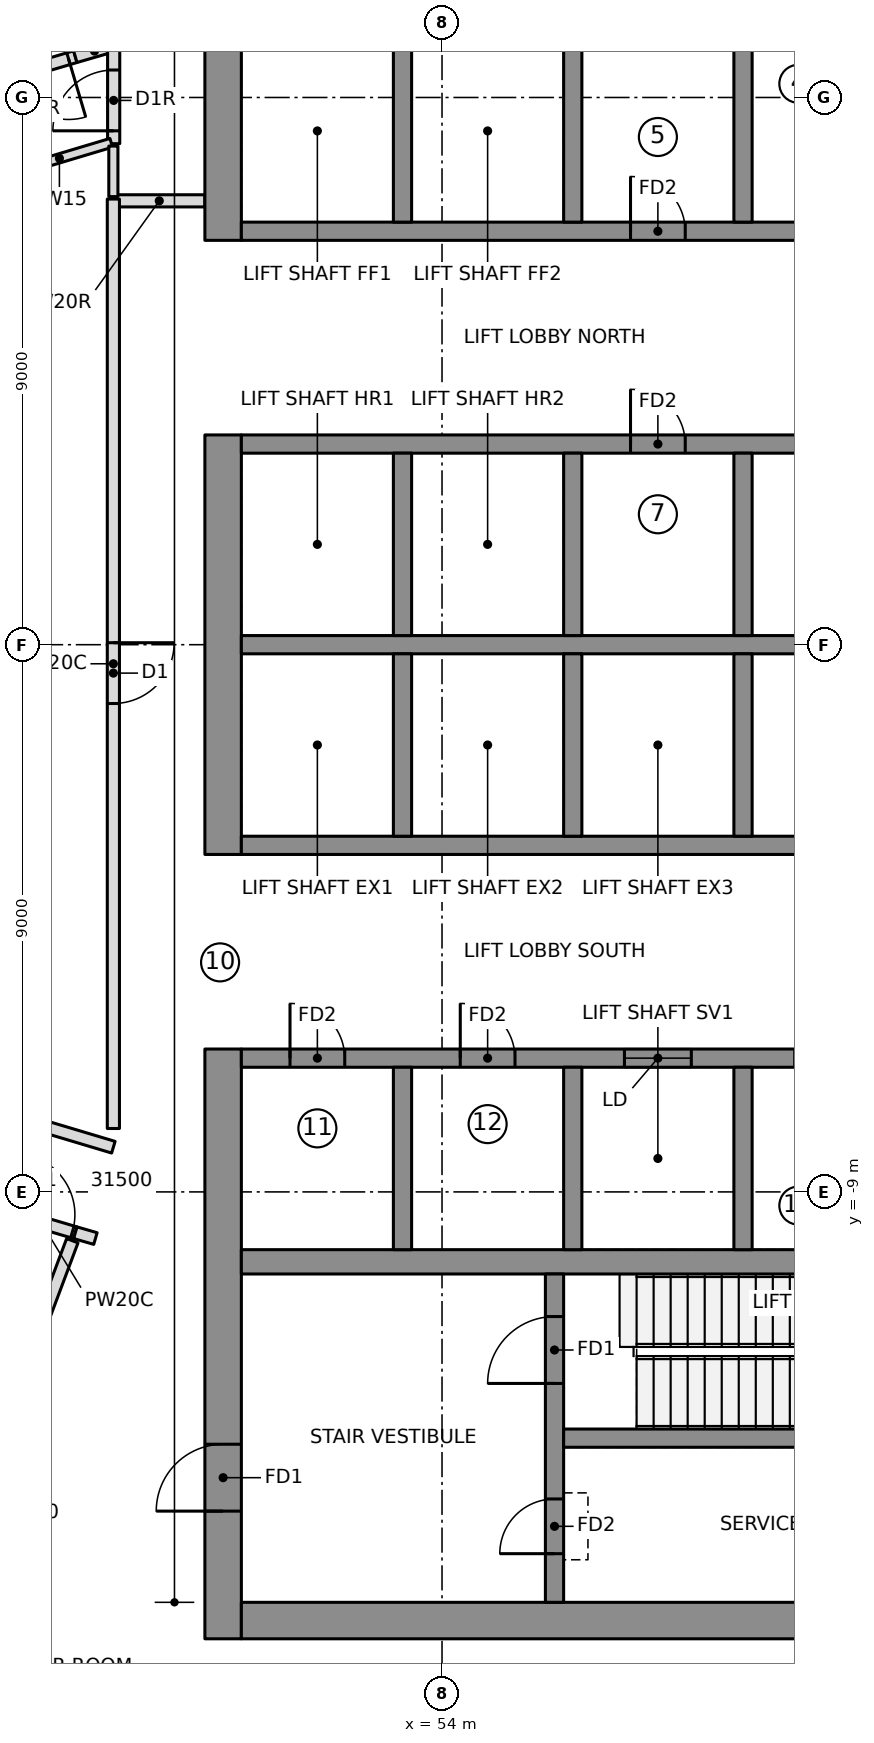
"""IFC4 building model, lengths in metres.
Left out: names, types, materials, properties, quantities, classifications, styles, units other than length and angle.
Written with IfcOpenShell. Run it as: python <this file> out.ifc"""

import sys

from ifc_helpers import new_model, si_unit, direction, frame, frame_2d, origin, place, context, subcontext, project, spatial, rectangle, extrude, element, fill, save


model = new_model("IFC4")
c1 = context("Model", 3, precision=1e-05, world=origin(), true_north=direction((0.0, 1.0)))
c2 = subcontext(c1, "Body", "Model", "MODEL_VIEW")
j1 = project(units=[si_unit("LENGTHUNIT", "METRE"), si_unit("PLANEANGLEUNIT", "RADIAN")], contexts=[c1])
p1 = place(None, origin())
s1 = spatial("IfcSite", under=j1, at=p1, CompositionType="ELEMENT")
p2 = place(p1, origin())
s2 = spatial("IfcBuilding", under=s1, at=p2, CompositionType="ELEMENT")
p3 = place(p2, frame((0.0, 0.0, 256.3)))
s3 = spatial("IfcBuildingStorey", under=s2, at=p3, CompositionType="ELEMENT", Elevation=256.3)
p4 = place(p3, frame((50.4, 6.65, 0.0), z_axis=(0.0, 0.0, 1.0), x_axis=(0.0, 1.0, 0.0)))
e1 = element("IfcWall", 1, at=p4, inside=s3, PredefinedType="SHEAR", context=c2, shape_type="SweptSolid", body=[
    extrude(rectangle(XDim=9.7, YDim=0.6, at=frame_2d((4.85, 0.0))), origin(), (0.0, 0.0, 1.0), 7.0),
])
p5 = place(p4, frame((6.5, 0.0, 0.0)))
e2 = element("IfcOpeningElement", 2, at=p5, cuts=e1, PredefinedType="OPENING", context=c2, shape_type="SweptSolid", body=[
    extrude(rectangle(XDim=1.1, YDim=2.1, at=frame_2d((0.55, 1.05))), frame((0.0, 0.31, 0.0), z_axis=(0.0, -1.0, 0.0), x_axis=(1.0, 0.0, 0.0)), (0.0, 0.0, 1.0), 0.62),
])
p6 = place(p3, frame((50.4, -3.45, 0.0), z_axis=(0.0, 0.0, 1.0), x_axis=(0.0, 1.0, 0.0)))
e3 = element("IfcWall", 3, at=p6, inside=s3, PredefinedType="SHEAR", context=c2, shape_type="SweptSolid", body=[
    extrude(rectangle(XDim=6.9, YDim=0.6, at=frame_2d((3.45, 0.0))), origin(), (0.0, 0.0, 1.0), 7.0),
])
p7 = place(p3, frame((50.4, -16.35, 0.0), z_axis=(0.0, 0.0, 1.0), x_axis=(0.0, 1.0, 0.0)))
e4 = element("IfcWall", 4, at=p7, inside=s3, PredefinedType="SHEAR", context=c2, shape_type="SweptSolid", body=[
    extrude(rectangle(XDim=9.7, YDim=0.6, at=frame_2d((4.85, 0.0))), origin(), (0.0, 0.0, 1.0), 7.0),
])
p8 = place(p7, frame((2.1, 0.0, 0.0)))
e5 = element("IfcOpeningElement", 5, at=p8, cuts=e4, PredefinedType="OPENING", context=c2, shape_type="SweptSolid", body=[
    extrude(rectangle(XDim=1.1, YDim=2.1, at=frame_2d((0.55, 1.05))), frame((0.0, 0.31, 0.0), z_axis=(0.0, -1.0, 0.0), x_axis=(1.0, 0.0, 0.0)), (0.0, 0.0, 1.0), 0.62),
])
p9 = place(p3, frame((50.7, -16.05, 0.0), z_axis=(0.0, 0.0, 1.0), x_axis=(1.0, 0.0, 0.0)))
e6 = element("IfcWall", 6, at=p9, inside=s3, PredefinedType="SHEAR", context=c2, shape_type="SweptSolid", body=[
    extrude(rectangle(XDim=13.62, YDim=0.6, at=frame_2d((6.81, 0.0))), origin(), (0.0, 0.0, 1.0), 7.0),
])
p10 = place(p3, frame((50.7, -10.15, 0.0), z_axis=(0.0, 0.0, 1.0), x_axis=(1.0, 0.0, 0.0)))
e7 = element("IfcWall", 7, at=p10, inside=s3, PredefinedType="SHEAR", context=c2, shape_type="SweptSolid", body=[
    extrude(rectangle(XDim=13.02, YDim=0.4, at=frame_2d((6.51, 0.0))), origin(), (0.0, 0.0, 1.0), 7.0),
])
p11 = place(p3, frame((50.7, 0.0, 0.0), z_axis=(0.0, 0.0, 1.0), x_axis=(1.0, 0.0, 0.0)))
e8 = element("IfcWall", 8, at=p11, inside=s3, PredefinedType="SHEAR", context=c2, shape_type="SweptSolid", body=[
    extrude(rectangle(XDim=10.9, YDim=0.3, at=frame_2d((5.45, 0.0))), origin(), (0.0, 0.0, 1.0), 7.0),
])
p12 = place(p3, frame((50.7, 3.3, 0.0), z_axis=(0.0, 0.0, 1.0), x_axis=(1.0, 0.0, 0.0)))
e9 = element("IfcWall", 9, at=p12, inside=s3, PredefinedType="SHEAR", context=c2, shape_type="SweptSolid", body=[
    extrude(rectangle(XDim=10.9, YDim=0.3, at=frame_2d((5.45, 0.0))), origin(), (0.0, 0.0, 1.0), 7.0),
])
p13 = place(p12, frame((6.4, 0.0, 0.0)))
e10 = element("IfcOpeningElement", 10, at=p13, cuts=e9, PredefinedType="OPENING", context=c2, shape_type="SweptSolid", body=[
    extrude(rectangle(XDim=0.9, YDim=2.1, at=frame_2d((0.45, 1.05))), frame((0.0, 0.16, 0.0), z_axis=(0.0, -1.0, 0.0), x_axis=(1.0, 0.0, 0.0)), (0.0, 0.0, 1.0), 0.32),
])
p14 = place(p12, frame((9.2, 0.0, 0.0)))
e11 = element("IfcOpeningElement", 11, at=p14, cuts=e9, PredefinedType="OPENING", context=c2, shape_type="SweptSolid", body=[
    extrude(rectangle(XDim=0.9, YDim=2.1, at=frame_2d((0.45, 1.05))), frame((0.0, 0.16, 0.0), z_axis=(0.0, -1.0, 0.0), x_axis=(1.0, 0.0, 0.0)), (0.0, 0.0, 1.0), 0.32),
])
p15 = place(p3, frame((50.7, 6.8, 0.0), z_axis=(0.0, 0.0, 1.0), x_axis=(1.0, 0.0, 0.0)))
e12 = element("IfcWall", 12, at=p15, inside=s3, PredefinedType="SHEAR", context=c2, shape_type="SweptSolid", body=[
    extrude(rectangle(XDim=10.9, YDim=0.3, at=frame_2d((5.45, 0.0))), origin(), (0.0, 0.0, 1.0), 7.0),
])
p16 = place(p15, frame((6.4, 0.0, 0.0)))
e13 = element("IfcOpeningElement", 13, at=p16, cuts=e12, PredefinedType="OPENING", context=c2, shape_type="SweptSolid", body=[
    extrude(rectangle(XDim=0.9, YDim=2.1, at=frame_2d((0.45, 1.05))), frame((0.0, 0.16, 0.0), z_axis=(0.0, -1.0, 0.0), x_axis=(1.0, 0.0, 0.0)), (0.0, 0.0, 1.0), 0.32),
])
p17 = place(p15, frame((9.2, 0.0, 0.0)))
e14 = element("IfcOpeningElement", 14, at=p17, cuts=e12, PredefinedType="OPENING", context=c2, shape_type="SweptSolid", body=[
    extrude(rectangle(XDim=0.9, YDim=2.1, at=frame_2d((0.45, 1.05))), frame((0.0, 0.16, 0.0), z_axis=(0.0, -1.0, 0.0), x_axis=(1.0, 0.0, 0.0)), (0.0, 0.0, 1.0), 0.32),
])
for number, where, z_axis, x_axis in (
    (15, (53.35, 0.15, 0.0), (0.0, 0.0, 1.0), (0.0, 1.0, 0.0)),
    (16, (53.35, 6.95, 0.0), (0.0, 0.0, 1.0), (0.0, 1.0, 0.0)),
    (17, (56.15, 0.15, 0.0), (0.0, 0.0, 1.0), (0.0, 1.0, 0.0)),
    (18, (56.15, 6.95, 0.0), (0.0, 0.0, 1.0), (0.0, 1.0, 0.0)),
    (19, (58.95, 0.15, 0.0), (0.0, 0.0, 1.0), (0.0, 1.0, 0.0)),
    (20, (58.95, 6.95, 0.0), (0.0, 0.0, 1.0), (0.0, 1.0, 0.0)),
):
    element("IfcWall", number, at=place(p3, frame(where, z_axis=z_axis, x_axis=x_axis)), inside=s3, PredefinedType="SHEAR", context=c2, shape_type="SweptSolid", body=[
        extrude(rectangle(XDim=3.0, YDim=0.3, at=frame_2d((1.5, 0.0))), origin(), (0.0, 0.0, 1.0), 7.0),
    ])
p18 = place(p3, frame((50.7, -3.3, 0.0), z_axis=(0.0, 0.0, 1.0), x_axis=(1.0, 0.0, 0.0)))
e21 = element("IfcWall", 21, at=p18, inside=s3, PredefinedType="SHEAR", context=c2, shape_type="SweptSolid", body=[
    extrude(rectangle(XDim=10.9, YDim=0.3, at=frame_2d((5.45, 0.0))), origin(), (0.0, 0.0, 1.0), 7.0),
])
p19 = place(p3, frame((50.7, -6.8, 0.0), z_axis=(0.0, 0.0, 1.0), x_axis=(1.0, 0.0, 0.0)))
e22 = element("IfcWall", 22, at=p19, inside=s3, PredefinedType="SHEAR", context=c2, shape_type="SweptSolid", body=[
    extrude(rectangle(XDim=10.9, YDim=0.3, at=frame_2d((5.45, 0.0))), origin(), (0.0, 0.0, 1.0), 7.0),
])
p20 = place(p19, frame((6.3, 0.0, 0.0)))
e23 = element("IfcOpeningElement", 23, at=p20, cuts=e22, PredefinedType="OPENING", context=c2, shape_type="SweptSolid", body=[
    extrude(rectangle(XDim=1.1, YDim=2.1, at=frame_2d((0.55, 1.05))), frame((0.0, 0.16, 0.0), z_axis=(0.0, -1.0, 0.0), x_axis=(1.0, 0.0, 0.0)), (0.0, 0.0, 1.0), 0.32),
])
p21 = place(p19, frame((9.1, 0.0, 0.0)))
e24 = element("IfcOpeningElement", 24, at=p21, cuts=e22, PredefinedType="OPENING", context=c2, shape_type="SweptSolid", body=[
    extrude(rectangle(XDim=1.1, YDim=2.1, at=frame_2d((0.55, 1.05))), frame((0.0, 0.16, 0.0), z_axis=(0.0, -1.0, 0.0), x_axis=(1.0, 0.0, 0.0)), (0.0, 0.0, 1.0), 0.32),
])
p22 = place(p19, frame((0.8, 0.0, 0.0)))
e25 = element("IfcOpeningElement", 25, at=p22, cuts=e22, PredefinedType="OPENING", context=c2, shape_type="SweptSolid", body=[
    extrude(rectangle(XDim=0.9, YDim=2.1, at=frame_2d((0.45, 1.05))), frame((0.0, 0.16, 0.0), z_axis=(0.0, -1.0, 0.0), x_axis=(1.0, 0.0, 0.0)), (0.0, 0.0, 1.0), 0.32),
])
p23 = place(p19, frame((3.6, 0.0, 0.0)))
e26 = element("IfcOpeningElement", 26, at=p23, cuts=e22, PredefinedType="OPENING", context=c2, shape_type="SweptSolid", body=[
    extrude(rectangle(XDim=0.9, YDim=2.1, at=frame_2d((0.45, 1.05))), frame((0.0, 0.16, 0.0), z_axis=(0.0, -1.0, 0.0), x_axis=(1.0, 0.0, 0.0)), (0.0, 0.0, 1.0), 0.32),
])
for number, where, z_axis, x_axis in (
    (27, (53.35, -3.15, 0.0), (0.0, 0.0, 1.0), (0.0, 1.0, 0.0)),
    (28, (53.35, -9.95, 0.0), (0.0, 0.0, 1.0), (0.0, 1.0, 0.0)),
    (29, (56.15, -3.15, 0.0), (0.0, 0.0, 1.0), (0.0, 1.0, 0.0)),
    (30, (56.15, -9.95, 0.0), (0.0, 0.0, 1.0), (0.0, 1.0, 0.0)),
    (31, (58.95, -3.15, 0.0), (0.0, 0.0, 1.0), (0.0, 1.0, 0.0)),
    (32, (58.95, -9.95, 0.0), (0.0, 0.0, 1.0), (0.0, 1.0, 0.0)),
):
    element("IfcWall", number, at=place(p3, frame(where, z_axis=z_axis, x_axis=x_axis)), inside=s3, PredefinedType="SHEAR", context=c2, shape_type="SweptSolid", body=[
        extrude(rectangle(XDim=3.0, YDim=0.3, at=frame_2d((1.5, 0.0))), origin(), (0.0, 0.0, 1.0), 7.0),
    ])
p24 = place(p3, frame((55.85, -15.75, 0.0), z_axis=(0.0, 0.0, 1.0), x_axis=(0.0, 1.0, 0.0)))
e33 = element("IfcWall", 33, at=p24, inside=s3, PredefinedType="SHEAR", context=c2, shape_type="SweptSolid", body=[
    extrude(rectangle(XDim=5.4, YDim=0.3, at=frame_2d((2.7, 0.0))), origin(), (0.0, 0.0, 1.0), 7.0),
])
p25 = place(p24, frame((3.6, 0.0, 0.0)))
e34 = element("IfcOpeningElement", 34, at=p25, cuts=e33, PredefinedType="OPENING", context=c2, shape_type="SweptSolid", body=[
    extrude(rectangle(XDim=1.1, YDim=2.1, at=frame_2d((0.55, 1.05))), frame((0.0, 0.16, 0.0), z_axis=(0.0, -1.0, 0.0), x_axis=(1.0, 0.0, 0.0)), (0.0, 0.0, 1.0), 0.32),
])
p26 = place(p24, frame((0.8, 0.0, 0.0)))
e35 = element("IfcOpeningElement", 35, at=p26, cuts=e33, PredefinedType="OPENING", context=c2, shape_type="SweptSolid", body=[
    extrude(rectangle(XDim=0.9, YDim=2.1, at=frame_2d((0.45, 1.05))), frame((0.0, 0.16, 0.0), z_axis=(0.0, -1.0, 0.0), x_axis=(1.0, 0.0, 0.0)), (0.0, 0.0, 1.0), 0.32),
])
p27 = place(p3, frame((56.0, -13.05, 0.0), z_axis=(0.0, 0.0, 1.0), x_axis=(1.0, 0.0, 0.0)))
e36 = element("IfcWall", 36, at=p27, inside=s3, PredefinedType="SHEAR", context=c2, shape_type="SweptSolid", body=[
    extrude(rectangle(XDim=7.72, YDim=0.3, at=frame_2d((3.86, 0.0))), origin(), (0.0, 0.0, 1.0), 7.0),
])
p28 = place(p3, frame((48.6, 7.3, 0.0), z_axis=(0.0, 0.0, 1.0), x_axis=(1.0, 0.0, 0.0)))
e37 = element("IfcWall", 37, at=p28, inside=s3, PredefinedType="PARTITIONING", context=c2, shape_type="SweptSolid", body=[
    extrude(rectangle(XDim=1.5, YDim=0.2, at=frame_2d((0.75, 0.0))), origin(), (0.0, 0.0, 1.0), 6.7),
])
p29 = place(p3, frame((47.969, 9.671, 0.0), z_axis=(0.0, 0.0, 1.0), x_axis=(-0.958867721668, -0.283853293696, 0.0)))
e38 = element("IfcWall", 38, at=p29, inside=s3, PredefinedType="PARTITIONING", context=c2, shape_type="SweptSolid", body=[
    extrude(rectangle(XDim=1.167, YDim=0.2, at=frame_2d((0.583, 0.0))), origin(), (0.0, 0.0, 1.0), 6.7),
])
p30 = place(p29, frame((0.117, 0.0, 0.0)))
e39 = element("IfcOpeningElement", 39, at=p30, cuts=e38, PredefinedType="OPENING", context=c2, shape_type="SweptSolid", body=[
    extrude(rectangle(XDim=1.0, YDim=2.1, at=frame_2d((0.5, 1.05))), frame((0.0, 0.11, 0.0), z_axis=(0.0, -1.0, 0.0), x_axis=(1.0, 0.0, 0.0)), (0.0, 0.0, 1.0), 0.22),
])
p31 = place(p3, frame((48.6, 9.854, 0.0), z_axis=(0.0, 0.0, 1.0), x_axis=(-0.960464925665, -0.27840101754, 0.0)))
e40 = element("IfcWall", 40, at=p31, inside=s3, PredefinedType="PARTITIONING", context=c2, shape_type="SweptSolid", body=[
    extrude(rectangle(XDim=0.657, YDim=0.2, at=frame_2d((0.328, 0.0))), origin(), (0.0, 0.0, 1.0), 6.7),
])
p32 = place(p3, frame((46.85, -9.34, 0.0), z_axis=(0.0, 0.0, 1.0), x_axis=(0.958867721668, -0.283853293696, 0.0)))
e41 = element("IfcWall", 41, at=p32, inside=s3, PredefinedType="PARTITIONING", context=c2, shape_type="SweptSolid", body=[
    extrude(rectangle(XDim=1.167, YDim=0.2, at=frame_2d((0.583, 0.0))), origin(), (0.0, 0.0, 1.0), 6.7),
])
p33 = place(p32, frame((0.117, 0.0, 0.0)))
e42 = element("IfcOpeningElement", 42, at=p33, cuts=e41, PredefinedType="OPENING", context=c2, shape_type="SweptSolid", body=[
    extrude(rectangle(XDim=1.0, YDim=2.1, at=frame_2d((0.5, 1.05))), frame((0.0, 0.11, 0.0), z_axis=(0.0, -1.0, 0.0), x_axis=(1.0, 0.0, 0.0)), (0.0, 0.0, 1.0), 0.22),
])
p34 = place(p3, frame((44.56, -18.762, 0.0), z_axis=(0.0, 0.0, 1.0), x_axis=(0.351123441588, 0.936329177569, 0.0)))
e43 = element("IfcWall", 43, at=p34, inside=s3, PredefinedType="PARTITIONING", context=c2, shape_type="SweptSolid", body=[
    extrude(rectangle(XDim=9.568, YDim=0.2, at=frame_2d((4.784, 0.0))), origin(), (0.0, 0.0, 1.0), 6.7),
])
p35 = place(p3, frame((48.6, 8.24, 0.0), z_axis=(0.0, 0.0, 1.0), x_axis=(0.0, 1.0, 0.0)))
e44 = element("IfcWall", 44, at=p35, inside=s3, PredefinedType="PARTITIONING", context=c2, shape_type="SweptSolid", body=[
    extrude(rectangle(XDim=1.623, YDim=0.2, at=frame_2d((0.812, 0.0))), origin(), (0.0, 0.0, 1.0), 6.7),
])
p36 = place(p35, frame((0.211, 0.0, 0.0)))
e45 = element("IfcOpeningElement", 45, at=p36, cuts=e44, PredefinedType="OPENING", context=c2, shape_type="SweptSolid", body=[
    extrude(rectangle(XDim=1.0, YDim=2.1, at=frame_2d((0.5, 1.05))), frame((0.0, 0.11, 0.0), z_axis=(0.0, -1.0, 0.0), x_axis=(1.0, 0.0, 0.0)), (0.0, 0.0, 1.0), 0.22),
])
p37 = place(p3, frame((47.969, -9.671, 0.0), z_axis=(0.0, 0.0, 1.0), x_axis=(0.96060909839, -0.277903148759, 0.0)))
e46 = element("IfcWall", 46, at=p37, inside=s3, PredefinedType="PARTITIONING", context=c2, shape_type="SweptSolid", body=[
    extrude(rectangle(XDim=0.344, YDim=0.2, at=frame_2d((0.172, 0.0))), origin(), (0.0, 0.0, 1.0), 6.7),
])
p38 = place(p3, frame((48.595, 7.33, 0.0), z_axis=(0.0, 0.0, 1.0), x_axis=(0.0, -1.0, 0.0)))
e47 = element("IfcWall", 47, at=p38, inside=s3, PredefinedType="PARTITIONING", context=c2, shape_type="SweptSolid", body=[
    extrude(rectangle(XDim=15.287, YDim=0.2, at=frame_2d((7.643, 0.0))), origin(), (0.0, 0.0, 1.0), 6.7),
])
p39 = place(p38, frame((7.297, 0.0, 0.0)))
e48 = element("IfcOpeningElement", 48, at=p39, cuts=e47, PredefinedType="OPENING", context=c2, shape_type="SweptSolid", body=[
    extrude(rectangle(XDim=1.0, YDim=2.1, at=frame_2d((0.5, 1.05))), frame((0.0, 0.11, 0.0), z_axis=(0.0, -1.0, 0.0), x_axis=(1.0, 0.0, 0.0)), (0.0, 0.0, 1.0), 0.22),
])
p40 = place(p3, frame((46.855, 7.744, 0.0), z_axis=(0.0, 0.0, 1.0), x_axis=(0.95802238392, 0.286693410996, 0.0)))
e49 = element("IfcWall", 49, at=p40, inside=s3, PredefinedType="PARTITIONING", context=c2, shape_type="SweptSolid", body=[
    extrude(rectangle(XDim=1.78, YDim=0.15, at=frame_2d((0.89, 0.0))), origin(), (0.0, 0.0, 1.0), 6.7),
])
p41 = place(p3, frame((48.595, 8.201, 0.0), z_axis=(0.0, 0.0, 1.0), x_axis=(0.0, -1.0, 0.0)))
e50 = element("IfcWall", 50, at=p41, inside=s3, PredefinedType="PARTITIONING", context=c2, shape_type="SweptSolid", body=[
    extrude(rectangle(XDim=0.831, YDim=0.15, at=frame_2d((0.416, 0.0))), origin(), (0.0, 0.0, 1.0), 6.7),
])
p42 = place(p3, frame((48.595, -8.265, 0.0), z_axis=(0.0, 0.0, 1.0), x_axis=(-0.958014760688, 0.286718883759, 0.0)))
e51 = element("IfcWall", 51, at=p42, inside=s3, PredefinedType="PARTITIONING", context=c2, shape_type="SweptSolid", body=[
    extrude(rectangle(XDim=1.816, YDim=0.2, at=frame_2d((0.908, 0.0))), origin(), (0.0, 0.0, 1.0), 6.7),
])
p43 = place(p30, origin())
e52 = element("IfcDoor", 52, at=p43, inside=s3, OperationType="SINGLE_SWING_RIGHT", PredefinedType="DOOR", context=c2, shape_type="SweptSolid", body=[
    extrude(rectangle(XDim=1.0, YDim=2.1, at=frame_2d((0.5, 1.05))), frame((0.0, 0.025, 0.0), z_axis=(0.0, -1.0, 0.0), x_axis=(1.0, 0.0, 0.0)), (0.0, 0.0, 1.0), 0.05),
])
fill(e39, e52)
p44 = place(p33, origin())
e53 = element("IfcDoor", 53, at=p44, inside=s3, OperationType="SINGLE_SWING_LEFT", PredefinedType="DOOR", context=c2, shape_type="SweptSolid", body=[
    extrude(rectangle(XDim=1.0, YDim=2.1, at=frame_2d((0.5, 1.05))), frame((0.0, 0.025, 0.0), z_axis=(0.0, -1.0, 0.0), x_axis=(1.0, 0.0, 0.0)), (0.0, 0.0, 1.0), 0.05),
])
fill(e42, e53)
p45 = place(p36, origin())
e54 = element("IfcDoor", 54, at=p45, inside=s3, OperationType="SINGLE_SWING_RIGHT", PredefinedType="DOOR", context=c2, shape_type="SweptSolid", body=[
    extrude(rectangle(XDim=1.0, YDim=2.1, at=frame_2d((0.5, 1.05))), frame((0.0, 0.025, 0.0), z_axis=(0.0, -1.0, 0.0), x_axis=(1.0, 0.0, 0.0)), (0.0, 0.0, 1.0), 0.05),
])
fill(e45, e54)
p46 = place(p39, origin())
e55 = element("IfcDoor", 55, at=p46, inside=s3, OperationType="SINGLE_SWING_LEFT", PredefinedType="DOOR", context=c2, shape_type="SweptSolid", body=[
    extrude(rectangle(XDim=1.0, YDim=2.1, at=frame_2d((0.5, 1.05))), frame((0.0, 0.025, 0.0), z_axis=(0.0, -1.0, 0.0), x_axis=(1.0, 0.0, 0.0)), (0.0, 0.0, 1.0), 0.05),
])
fill(e48, e55)
p47 = place(p20, origin())
e56 = element("IfcDoor", 56, at=p47, inside=s3, OperationType="DOUBLE_DOOR_SLIDING", PredefinedType="DOOR", context=c2, shape_type="SweptSolid", body=[
    extrude(rectangle(XDim=1.1, YDim=2.1, at=frame_2d((0.55, 1.05))), frame((0.0, 0.025, 0.0), z_axis=(0.0, -1.0, 0.0), x_axis=(1.0, 0.0, 0.0)), (0.0, 0.0, 1.0), 0.05),
])
fill(e23, e56)
p48 = place(p25, origin())
e57 = element("IfcDoor", 57, at=p48, inside=s3, OperationType="SINGLE_SWING_RIGHT", PredefinedType="DOOR", context=c2, shape_type="SweptSolid", body=[
    extrude(rectangle(XDim=1.1, YDim=2.1, at=frame_2d((0.55, 1.05))), frame((0.0, 0.025, 0.0), z_axis=(0.0, -1.0, 0.0), x_axis=(1.0, 0.0, 0.0)), (0.0, 0.0, 1.0), 0.05),
])
fill(e34, e57)
p49 = place(p8, origin())
e58 = element("IfcDoor", 58, at=p49, inside=s3, OperationType="SINGLE_SWING_RIGHT", PredefinedType="DOOR", context=c2, shape_type="SweptSolid", body=[
    extrude(rectangle(XDim=1.1, YDim=2.1, at=frame_2d((0.55, 1.05))), frame((0.0, 0.025, 0.0), z_axis=(0.0, -1.0, 0.0), x_axis=(1.0, 0.0, 0.0)), (0.0, 0.0, 1.0), 0.05),
])
fill(e5, e58)
p50 = place(p26, origin())
e59 = element("IfcDoor", 59, at=p50, inside=s3, OperationType="SINGLE_SWING_LEFT", PredefinedType="DOOR", context=c2, shape_type="SweptSolid", body=[
    extrude(rectangle(XDim=0.9, YDim=2.1, at=frame_2d((0.45, 1.05))), frame((0.0, 0.025, 0.0), z_axis=(0.0, -1.0, 0.0), x_axis=(1.0, 0.0, 0.0)), (0.0, 0.0, 1.0), 0.05),
])
fill(e35, e59)
p51 = place(p16, origin())
e60 = element("IfcDoor", 60, at=p51, inside=s3, OperationType="SINGLE_SWING_LEFT", PredefinedType="DOOR", context=c2, shape_type="SweptSolid", body=[
    extrude(rectangle(XDim=0.9, YDim=2.1, at=frame_2d((0.45, 1.05))), frame((0.0, 0.025, 0.0), z_axis=(0.0, -1.0, 0.0), x_axis=(1.0, 0.0, 0.0)), (0.0, 0.0, 1.0), 0.05),
])
fill(e13, e60)
p52 = place(p13, origin())
e61 = element("IfcDoor", 61, at=p52, inside=s3, OperationType="SINGLE_SWING_LEFT", PredefinedType="DOOR", context=c2, shape_type="SweptSolid", body=[
    extrude(rectangle(XDim=0.9, YDim=2.1, at=frame_2d((0.45, 1.05))), frame((0.0, 0.025, 0.0), z_axis=(0.0, -1.0, 0.0), x_axis=(1.0, 0.0, 0.0)), (0.0, 0.0, 1.0), 0.05),
])
fill(e10, e61)
p53 = place(p22, origin())
e62 = element("IfcDoor", 62, at=p53, inside=s3, OperationType="SINGLE_SWING_LEFT", PredefinedType="DOOR", context=c2, shape_type="SweptSolid", body=[
    extrude(rectangle(XDim=0.9, YDim=2.1, at=frame_2d((0.45, 1.05))), frame((0.0, 0.025, 0.0), z_axis=(0.0, -1.0, 0.0), x_axis=(1.0, 0.0, 0.0)), (0.0, 0.0, 1.0), 0.05),
])
fill(e25, e62)
p54 = place(p23, origin())
e63 = element("IfcDoor", 63, at=p54, inside=s3, OperationType="SINGLE_SWING_LEFT", PredefinedType="DOOR", context=c2, shape_type="SweptSolid", body=[
    extrude(rectangle(XDim=0.9, YDim=2.1, at=frame_2d((0.45, 1.05))), frame((0.0, 0.025, 0.0), z_axis=(0.0, -1.0, 0.0), x_axis=(1.0, 0.0, 0.0)), (0.0, 0.0, 1.0), 0.05),
])
fill(e26, e63)
save(model, sys.argv[1])
